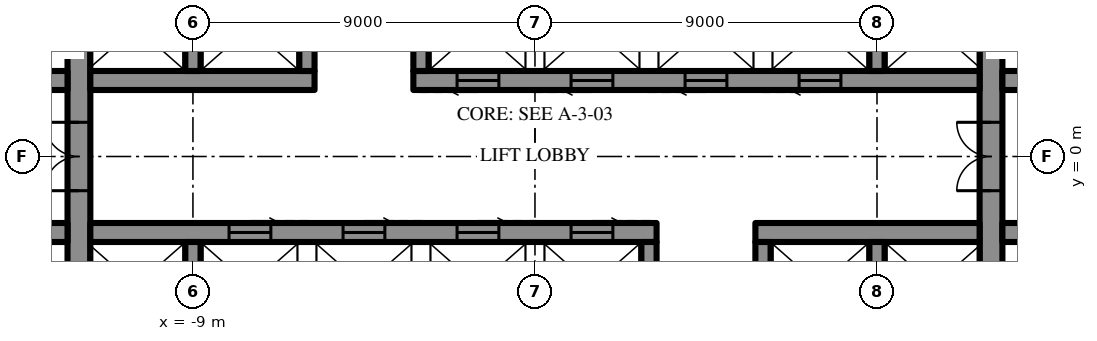
"""IFC4 building model, lengths in metres.
Left out: names, types, materials, properties, quantities, classifications, styles, units other than length and angle.
Written with IfcOpenShell. Run it as: python <this file> out.ifc"""

import sys

from ifc_helpers import new_model, si_unit, direction, frame, frame_2d, origin, place, context, subcontext, project, spatial, rectangle, extrude, element, fill, save


model = new_model("IFC4")
c1 = context("Model", 3, precision=1e-05, world=origin(), true_north=direction((0.0, 1.0)))
c2 = subcontext(c1, "Body", "Model", "MODEL_VIEW")
j1 = project(units=[si_unit("LENGTHUNIT", "METRE"), si_unit("PLANEANGLEUNIT", "RADIAN")], contexts=[c1])
p1 = place(None, origin())
s1 = spatial("IfcSite", under=j1, at=p1, CompositionType="ELEMENT")
p2 = place(p1, origin())
s2 = spatial("IfcBuilding", under=s1, at=p2, CompositionType="ELEMENT")
p3 = place(p2, frame((0.0, 0.0, 278.5)))
s3 = spatial("IfcBuildingStorey", under=s2, at=p3, CompositionType="ELEMENT", Elevation=278.5)
p4 = place(p3, frame((12.0, -10.7, 0.0), z_axis=(0.0, 0.0, 1.0), x_axis=(0.0, 1.0, 0.0)))
e1 = element("IfcWall", 1, at=p4, inside=s3, PredefinedType="SHEAR", context=c2, shape_type="SweptSolid", body=[
    extrude(rectangle(XDim=21.4, YDim=0.6, at=frame_2d((10.7, 0.0))), origin(), (0.0, 0.0, 1.0), 4.2),
])
p5 = place(p4, frame((9.8, 0.0, 0.0)))
e2 = element("IfcOpeningElement", 2, at=p5, cuts=e1, PredefinedType="OPENING", context=c2, shape_type="SweptSolid", body=[
    extrude(rectangle(XDim=1.8, YDim=2.4, at=frame_2d((0.9, 1.2))), frame((0.0, 0.31, 0.0), z_axis=(0.0, -1.0, 0.0), x_axis=(1.0, 0.0, 0.0)), (0.0, 0.0, 1.0), 0.62),
])
p6 = place(p3, frame((-12.0, -10.7, 0.0), z_axis=(0.0, 0.0, 1.0), x_axis=(0.0, 1.0, 0.0)))
e3 = element("IfcWall", 3, at=p6, inside=s3, PredefinedType="SHEAR", context=c2, shape_type="SweptSolid", body=[
    extrude(rectangle(XDim=21.4, YDim=0.6, at=frame_2d((10.7, 0.0))), origin(), (0.0, 0.0, 1.0), 4.2),
])
p7 = place(p6, frame((9.8, 0.0, 0.0)))
e4 = element("IfcOpeningElement", 4, at=p7, cuts=e3, PredefinedType="OPENING", context=c2, shape_type="SweptSolid", body=[
    extrude(rectangle(XDim=1.8, YDim=2.4, at=frame_2d((0.9, 1.2))), frame((0.0, 0.31, 0.0), z_axis=(0.0, -1.0, 0.0), x_axis=(1.0, 0.0, 0.0)), (0.0, 0.0, 1.0), 0.62),
])
p8 = place(p3, frame((-14.5, 2.0, 0.0), z_axis=(0.0, 0.0, 1.0), x_axis=(1.0, 0.0, 0.0)))
e5 = element("IfcWall", 5, at=p8, inside=s3, PredefinedType="SHEAR", context=c2, shape_type="SweptSolid", body=[
    extrude(rectangle(XDim=2.2, YDim=0.5, at=frame_2d((1.1, 0.0))), origin(), (0.0, 0.0, 1.0), 4.2),
])
p9 = place(p8, frame((0.5, 0.0, 0.0)))
e6 = element("IfcOpeningElement", 6, at=p9, cuts=e5, PredefinedType="OPENING", context=c2, shape_type="SweptSolid", body=[
    extrude(rectangle(XDim=0.9, YDim=2.2, at=frame_2d((0.45, 1.1))), frame((0.0, 0.26, 0.0), z_axis=(0.0, -1.0, 0.0), x_axis=(1.0, 0.0, 0.0)), (0.0, 0.0, 1.0), 0.52),
])
p10 = place(p3, frame((-11.7, 2.0, 0.0), z_axis=(0.0, 0.0, 1.0), x_axis=(1.0, 0.0, 0.0)))
e7 = element("IfcWall", 7, at=p10, inside=s3, PredefinedType="SHEAR", context=c2, shape_type="SweptSolid", body=[
    extrude(rectangle(XDim=5.9, YDim=0.5, at=frame_2d((2.95, 0.0))), origin(), (0.0, 0.0, 1.0), 4.2),
])
p11 = place(p3, frame((-3.2, 2.0, 0.0), z_axis=(0.0, 0.0, 1.0), x_axis=(1.0, 0.0, 0.0)))
e8 = element("IfcWall", 8, at=p11, inside=s3, PredefinedType="SHEAR", context=c2, shape_type="SweptSolid", body=[
    extrude(rectangle(XDim=14.9, YDim=0.5, at=frame_2d((7.45, 0.0))), origin(), (0.0, 0.0, 1.0), 4.2),
])
p12 = place(p11, frame((1.15, 0.0, 0.0)))
e9 = element("IfcOpeningElement", 9, at=p12, cuts=e8, PredefinedType="OPENING", context=c2, shape_type="SweptSolid", body=[
    extrude(rectangle(XDim=1.1, YDim=2.2, at=frame_2d((0.55, 1.1))), frame((0.0, 0.26, 0.0), z_axis=(0.0, -1.0, 0.0), x_axis=(1.0, 0.0, 0.0)), (0.0, 0.0, 1.0), 0.52),
])
p13 = place(p11, frame((4.15, 0.0, 0.0)))
e10 = element("IfcOpeningElement", 10, at=p13, cuts=e8, PredefinedType="OPENING", context=c2, shape_type="SweptSolid", body=[
    extrude(rectangle(XDim=1.1, YDim=2.2, at=frame_2d((0.55, 1.1))), frame((0.0, 0.26, 0.0), z_axis=(0.0, -1.0, 0.0), x_axis=(1.0, 0.0, 0.0)), (0.0, 0.0, 1.0), 0.52),
])
p14 = place(p11, frame((7.15, 0.0, 0.0)))
e11 = element("IfcOpeningElement", 11, at=p14, cuts=e8, PredefinedType="OPENING", context=c2, shape_type="SweptSolid", body=[
    extrude(rectangle(XDim=1.1, YDim=2.2, at=frame_2d((0.55, 1.1))), frame((0.0, 0.26, 0.0), z_axis=(0.0, -1.0, 0.0), x_axis=(1.0, 0.0, 0.0)), (0.0, 0.0, 1.0), 0.52),
])
p15 = place(p11, frame((10.15, 0.0, 0.0)))
e12 = element("IfcOpeningElement", 12, at=p15, cuts=e8, PredefinedType="OPENING", context=c2, shape_type="SweptSolid", body=[
    extrude(rectangle(XDim=1.1, YDim=2.2, at=frame_2d((0.55, 1.1))), frame((0.0, 0.26, 0.0), z_axis=(0.0, -1.0, 0.0), x_axis=(1.0, 0.0, 0.0)), (0.0, 0.0, 1.0), 0.52),
])
p16 = place(p3, frame((12.3, 2.0, 0.0), z_axis=(0.0, 0.0, 1.0), x_axis=(1.0, 0.0, 0.0)))
e13 = element("IfcWall", 13, at=p16, inside=s3, PredefinedType="SHEAR", context=c2, shape_type="SweptSolid", body=[
    extrude(rectangle(XDim=2.2, YDim=0.5, at=frame_2d((1.1, 0.0))), origin(), (0.0, 0.0, 1.0), 4.2),
])
p17 = place(p16, frame((0.8, 0.0, 0.0)))
e14 = element("IfcOpeningElement", 14, at=p17, cuts=e13, PredefinedType="OPENING", context=c2, shape_type="SweptSolid", body=[
    extrude(rectangle(XDim=0.9, YDim=2.2, at=frame_2d((0.45, 1.1))), frame((0.0, 0.26, 0.0), z_axis=(0.0, -1.0, 0.0), x_axis=(1.0, 0.0, 0.0)), (0.0, 0.0, 1.0), 0.52),
])
for number, where, z_axis, x_axis in (
    (15, (-9.0, 2.25, 0.0), (0.0, 0.0, 1.0), (0.0, 1.0, 0.0)),
    (16, (-6.0, 2.25, 0.0), (0.0, 0.0, 1.0), (0.0, 1.0, 0.0)),
    (17, (-3.0, 2.25, 0.0), (0.0, 0.0, 1.0), (0.0, 1.0, 0.0)),
    (18, (9.0, 2.25, 0.0), (0.0, 0.0, 1.0), (0.0, 1.0, 0.0)),
):
    element("IfcWall", number, at=place(p3, frame(where, z_axis=z_axis, x_axis=x_axis)), inside=s3, PredefinedType="SHEAR", context=c2, shape_type="SweptSolid", body=[
        extrude(rectangle(XDim=2.3, YDim=0.4, at=frame_2d((1.15, 0.0))), origin(), (0.0, 0.0, 1.0), 4.2),
    ])
p18 = place(p3, frame((14.5, -2.0, 0.0), z_axis=(0.0, 0.0, 1.0), x_axis=(-1.0, 0.0, 0.0)))
e19 = element("IfcWall", 19, at=p18, inside=s3, PredefinedType="SHEAR", context=c2, shape_type="SweptSolid", body=[
    extrude(rectangle(XDim=2.2, YDim=0.5, at=frame_2d((1.1, 0.0))), origin(), (0.0, 0.0, 1.0), 4.2),
])
p19 = place(p18, frame((0.5, 0.0, 0.0)))
e20 = element("IfcOpeningElement", 20, at=p19, cuts=e19, PredefinedType="OPENING", context=c2, shape_type="SweptSolid", body=[
    extrude(rectangle(XDim=0.9, YDim=2.2, at=frame_2d((0.45, 1.1))), frame((0.0, 0.26, 0.0), z_axis=(0.0, -1.0, 0.0), x_axis=(1.0, 0.0, 0.0)), (0.0, 0.0, 1.0), 0.52),
])
p20 = place(p3, frame((11.7, -2.0, 0.0), z_axis=(0.0, 0.0, 1.0), x_axis=(-1.0, 0.0, 0.0)))
e21 = element("IfcWall", 21, at=p20, inside=s3, PredefinedType="SHEAR", context=c2, shape_type="SweptSolid", body=[
    extrude(rectangle(XDim=5.9, YDim=0.5, at=frame_2d((2.95, 0.0))), origin(), (0.0, 0.0, 1.0), 4.2),
])
p21 = place(p3, frame((3.2, -2.0, 0.0), z_axis=(0.0, 0.0, 1.0), x_axis=(-1.0, 0.0, 0.0)))
e22 = element("IfcWall", 22, at=p21, inside=s3, PredefinedType="SHEAR", context=c2, shape_type="SweptSolid", body=[
    extrude(rectangle(XDim=14.9, YDim=0.5, at=frame_2d((7.45, 0.0))), origin(), (0.0, 0.0, 1.0), 4.2),
])
p22 = place(p21, frame((1.15, 0.0, 0.0)))
e23 = element("IfcOpeningElement", 23, at=p22, cuts=e22, PredefinedType="OPENING", context=c2, shape_type="SweptSolid", body=[
    extrude(rectangle(XDim=1.1, YDim=2.2, at=frame_2d((0.55, 1.1))), frame((0.0, 0.26, 0.0), z_axis=(0.0, -1.0, 0.0), x_axis=(1.0, 0.0, 0.0)), (0.0, 0.0, 1.0), 0.52),
])
p23 = place(p21, frame((4.15, 0.0, 0.0)))
e24 = element("IfcOpeningElement", 24, at=p23, cuts=e22, PredefinedType="OPENING", context=c2, shape_type="SweptSolid", body=[
    extrude(rectangle(XDim=1.1, YDim=2.2, at=frame_2d((0.55, 1.1))), frame((0.0, 0.26, 0.0), z_axis=(0.0, -1.0, 0.0), x_axis=(1.0, 0.0, 0.0)), (0.0, 0.0, 1.0), 0.52),
])
p24 = place(p21, frame((7.15, 0.0, 0.0)))
e25 = element("IfcOpeningElement", 25, at=p24, cuts=e22, PredefinedType="OPENING", context=c2, shape_type="SweptSolid", body=[
    extrude(rectangle(XDim=1.1, YDim=2.2, at=frame_2d((0.55, 1.1))), frame((0.0, 0.26, 0.0), z_axis=(0.0, -1.0, 0.0), x_axis=(1.0, 0.0, 0.0)), (0.0, 0.0, 1.0), 0.52),
])
p25 = place(p21, frame((10.15, 0.0, 0.0)))
e26 = element("IfcOpeningElement", 26, at=p25, cuts=e22, PredefinedType="OPENING", context=c2, shape_type="SweptSolid", body=[
    extrude(rectangle(XDim=1.1, YDim=2.2, at=frame_2d((0.55, 1.1))), frame((0.0, 0.26, 0.0), z_axis=(0.0, -1.0, 0.0), x_axis=(1.0, 0.0, 0.0)), (0.0, 0.0, 1.0), 0.52),
])
p26 = place(p3, frame((-12.3, -2.0, 0.0), z_axis=(0.0, 0.0, 1.0), x_axis=(-1.0, 0.0, 0.0)))
e27 = element("IfcWall", 27, at=p26, inside=s3, PredefinedType="SHEAR", context=c2, shape_type="SweptSolid", body=[
    extrude(rectangle(XDim=2.2, YDim=0.5, at=frame_2d((1.1, 0.0))), origin(), (0.0, 0.0, 1.0), 4.2),
])
p27 = place(p26, frame((0.8, 0.0, 0.0)))
e28 = element("IfcOpeningElement", 28, at=p27, cuts=e27, PredefinedType="OPENING", context=c2, shape_type="SweptSolid", body=[
    extrude(rectangle(XDim=0.9, YDim=2.2, at=frame_2d((0.45, 1.1))), frame((0.0, 0.26, 0.0), z_axis=(0.0, -1.0, 0.0), x_axis=(1.0, 0.0, 0.0)), (0.0, 0.0, 1.0), 0.52),
])
for number, where, z_axis, x_axis in (
    (29, (9.0, -2.25, 0.0), (0.0, 0.0, 1.0), (0.0, -1.0, 0.0)),
    (30, (6.0, -2.25, 0.0), (0.0, 0.0, 1.0), (0.0, -1.0, 0.0)),
    (31, (3.0, -2.25, 0.0), (0.0, 0.0, 1.0), (0.0, -1.0, 0.0)),
    (32, (-9.0, -2.25, 0.0), (0.0, 0.0, 1.0), (0.0, -1.0, 0.0)),
):
    element("IfcWall", number, at=place(p3, frame(where, z_axis=z_axis, x_axis=x_axis)), inside=s3, PredefinedType="SHEAR", context=c2, shape_type="SweptSolid", body=[
        extrude(rectangle(XDim=2.3, YDim=0.4, at=frame_2d((1.15, 0.0))), origin(), (0.0, 0.0, 1.0), 4.2),
    ])
p28 = place(p5, origin())
e33 = element("IfcDoor", 33, at=p28, inside=s3, OperationType="DOUBLE_DOOR_SINGLE_SWING", PredefinedType="DOOR", context=c2, shape_type="SweptSolid", body=[
    extrude(rectangle(XDim=1.8, YDim=2.4, at=frame_2d((0.9, 1.2))), frame((0.0, 0.025, 0.0), z_axis=(0.0, -1.0, 0.0), x_axis=(1.0, 0.0, 0.0)), (0.0, 0.0, 1.0), 0.05),
])
fill(e2, e33)
p29 = place(p7, origin())
e34 = element("IfcDoor", 34, at=p29, inside=s3, OperationType="DOUBLE_DOOR_SINGLE_SWING", PredefinedType="DOOR", context=c2, shape_type="SweptSolid", body=[
    extrude(rectangle(XDim=1.8, YDim=2.4, at=frame_2d((0.9, 1.2))), frame((0.0, 0.025, 0.0), z_axis=(0.0, -1.0, 0.0), x_axis=(1.0, 0.0, 0.0)), (0.0, 0.0, 1.0), 0.05),
])
fill(e4, e34)
p30 = place(p12, frame((1.1, 0.0, 0.0), z_axis=(0.0, 0.0, 1.0), x_axis=(-1.0, 0.0, 0.0)))
e35 = element("IfcDoor", 35, at=p30, inside=s3, OperationType="SLIDING_TO_LEFT", PredefinedType="DOOR", context=c2, shape_type="SweptSolid", body=[
    extrude(rectangle(XDim=1.1, YDim=2.2, at=frame_2d((0.55, 1.1))), frame((0.0, 0.025, 0.0), z_axis=(0.0, -1.0, 0.0), x_axis=(1.0, 0.0, 0.0)), (0.0, 0.0, 1.0), 0.05),
])
fill(e9, e35)
p31 = place(p13, frame((1.1, 0.0, 0.0), z_axis=(0.0, 0.0, 1.0), x_axis=(-1.0, 0.0, 0.0)))
e36 = element("IfcDoor", 36, at=p31, inside=s3, OperationType="SLIDING_TO_LEFT", PredefinedType="DOOR", context=c2, shape_type="SweptSolid", body=[
    extrude(rectangle(XDim=1.1, YDim=2.2, at=frame_2d((0.55, 1.1))), frame((0.0, 0.025, 0.0), z_axis=(0.0, -1.0, 0.0), x_axis=(1.0, 0.0, 0.0)), (0.0, 0.0, 1.0), 0.05),
])
fill(e10, e36)
p32 = place(p14, frame((1.1, 0.0, 0.0), z_axis=(0.0, 0.0, 1.0), x_axis=(-1.0, 0.0, 0.0)))
e37 = element("IfcDoor", 37, at=p32, inside=s3, OperationType="SLIDING_TO_LEFT", PredefinedType="DOOR", context=c2, shape_type="SweptSolid", body=[
    extrude(rectangle(XDim=1.1, YDim=2.2, at=frame_2d((0.55, 1.1))), frame((0.0, 0.025, 0.0), z_axis=(0.0, -1.0, 0.0), x_axis=(1.0, 0.0, 0.0)), (0.0, 0.0, 1.0), 0.05),
])
fill(e11, e37)
p33 = place(p15, frame((1.1, 0.0, 0.0), z_axis=(0.0, 0.0, 1.0), x_axis=(-1.0, 0.0, 0.0)))
e38 = element("IfcDoor", 38, at=p33, inside=s3, OperationType="SLIDING_TO_LEFT", PredefinedType="DOOR", context=c2, shape_type="SweptSolid", body=[
    extrude(rectangle(XDim=1.1, YDim=2.2, at=frame_2d((0.55, 1.1))), frame((0.0, 0.025, 0.0), z_axis=(0.0, -1.0, 0.0), x_axis=(1.0, 0.0, 0.0)), (0.0, 0.0, 1.0), 0.05),
])
fill(e12, e38)
p34 = place(p22, frame((1.1, 0.0, 0.0), z_axis=(0.0, 0.0, 1.0), x_axis=(-1.0, 0.0, 0.0)))
e39 = element("IfcDoor", 39, at=p34, inside=s3, OperationType="SLIDING_TO_LEFT", PredefinedType="DOOR", context=c2, shape_type="SweptSolid", body=[
    extrude(rectangle(XDim=1.1, YDim=2.2, at=frame_2d((0.55, 1.1))), frame((0.0, 0.025, 0.0), z_axis=(0.0, -1.0, 0.0), x_axis=(1.0, 0.0, 0.0)), (0.0, 0.0, 1.0), 0.05),
])
fill(e23, e39)
p35 = place(p23, frame((1.1, 0.0, 0.0), z_axis=(0.0, 0.0, 1.0), x_axis=(-1.0, 0.0, 0.0)))
e40 = element("IfcDoor", 40, at=p35, inside=s3, OperationType="SLIDING_TO_LEFT", PredefinedType="DOOR", context=c2, shape_type="SweptSolid", body=[
    extrude(rectangle(XDim=1.1, YDim=2.2, at=frame_2d((0.55, 1.1))), frame((0.0, 0.025, 0.0), z_axis=(0.0, -1.0, 0.0), x_axis=(1.0, 0.0, 0.0)), (0.0, 0.0, 1.0), 0.05),
])
fill(e24, e40)
p36 = place(p24, frame((1.1, 0.0, 0.0), z_axis=(0.0, 0.0, 1.0), x_axis=(-1.0, 0.0, 0.0)))
e41 = element("IfcDoor", 41, at=p36, inside=s3, OperationType="SLIDING_TO_LEFT", PredefinedType="DOOR", context=c2, shape_type="SweptSolid", body=[
    extrude(rectangle(XDim=1.1, YDim=2.2, at=frame_2d((0.55, 1.1))), frame((0.0, 0.025, 0.0), z_axis=(0.0, -1.0, 0.0), x_axis=(1.0, 0.0, 0.0)), (0.0, 0.0, 1.0), 0.05),
])
fill(e25, e41)
p37 = place(p25, frame((1.1, 0.0, 0.0), z_axis=(0.0, 0.0, 1.0), x_axis=(-1.0, 0.0, 0.0)))
e42 = element("IfcDoor", 42, at=p37, inside=s3, OperationType="SLIDING_TO_LEFT", PredefinedType="DOOR", context=c2, shape_type="SweptSolid", body=[
    extrude(rectangle(XDim=1.1, YDim=2.2, at=frame_2d((0.55, 1.1))), frame((0.0, 0.025, 0.0), z_axis=(0.0, -1.0, 0.0), x_axis=(1.0, 0.0, 0.0)), (0.0, 0.0, 1.0), 0.05),
])
fill(e26, e42)
save(model, sys.argv[1])
